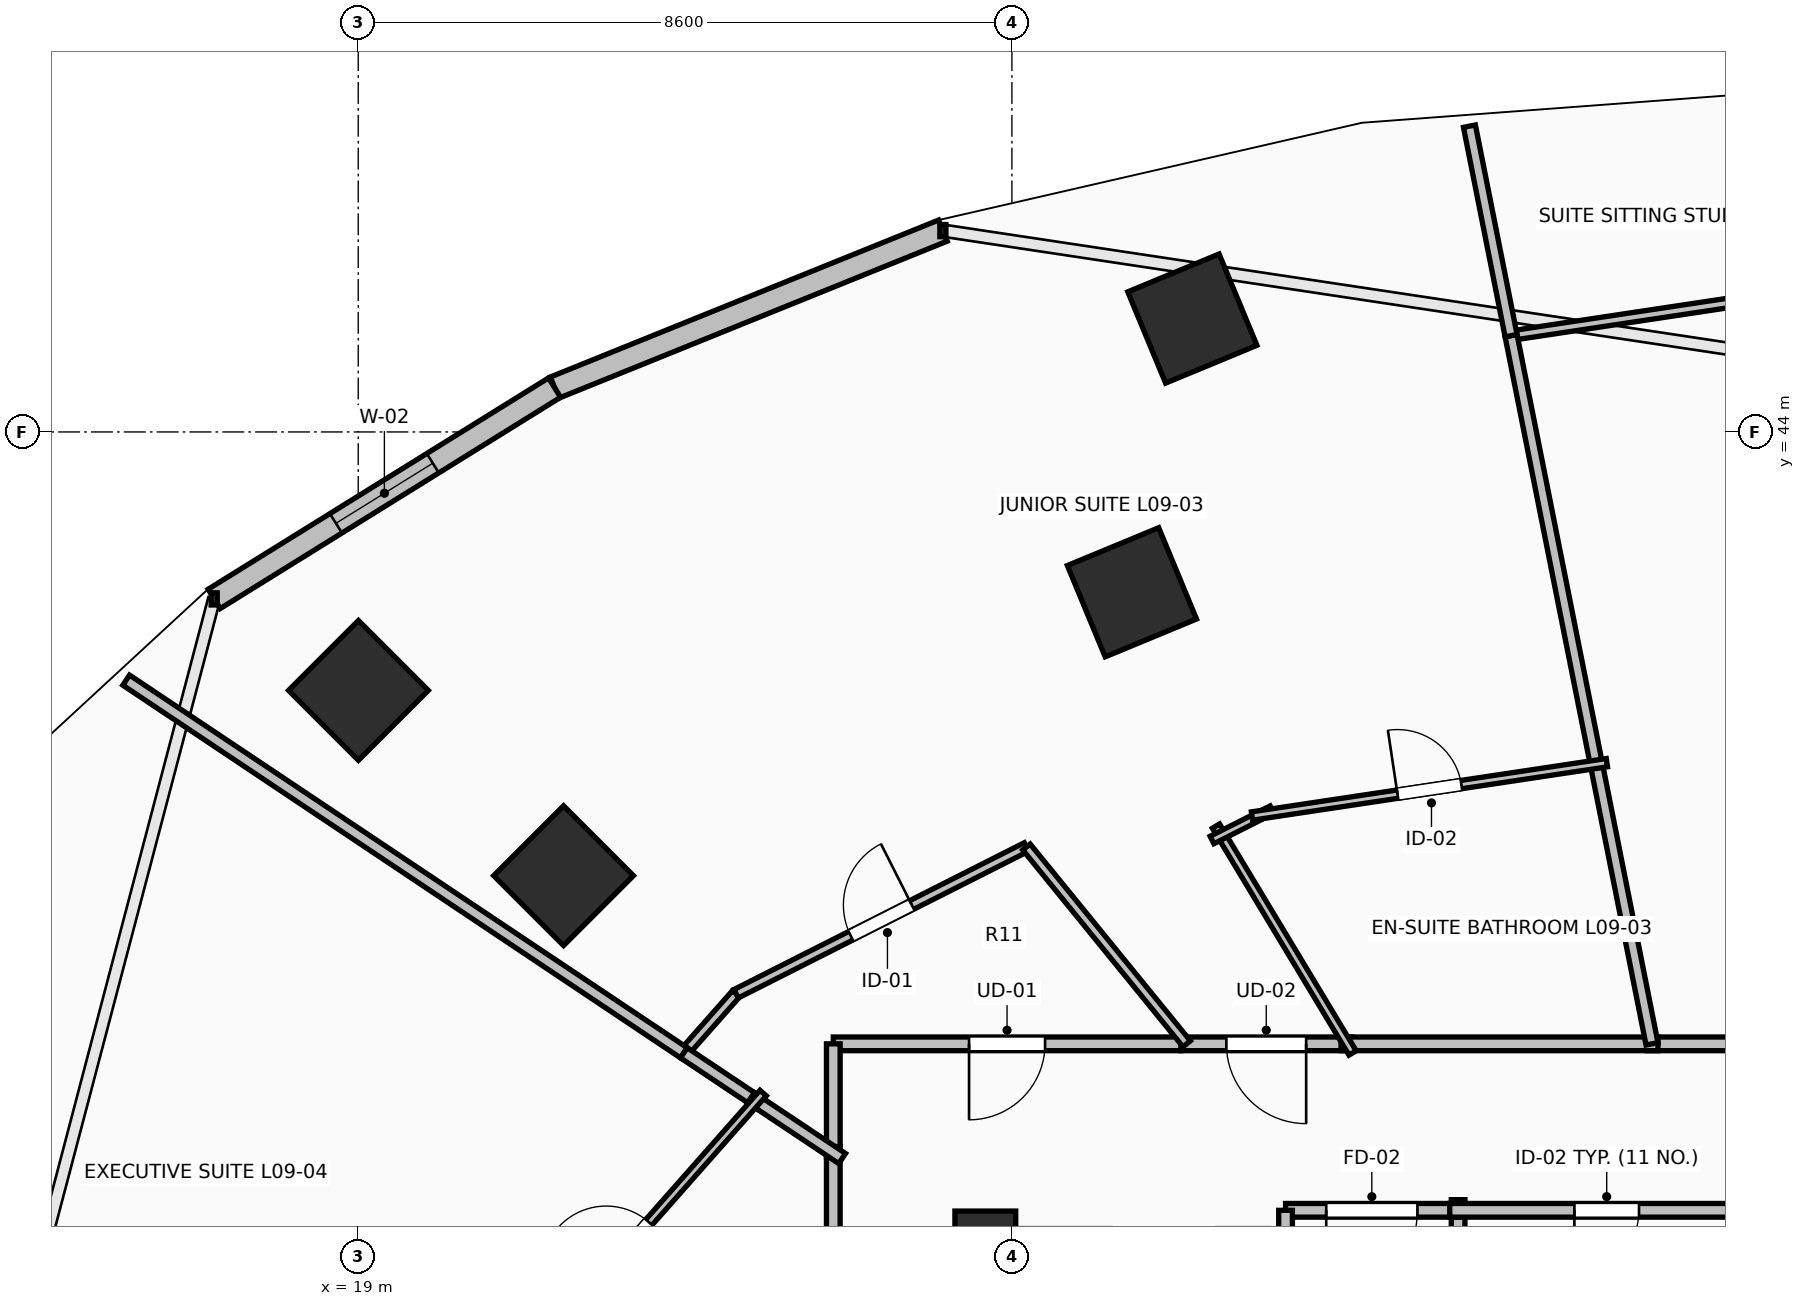
"""IFC4 building model, lengths in metres.
Left out: names, types, materials, properties, quantities, classifications, styles, units other than length and angle.
Written with IfcOpenShell. Run it as: python <this file> out.ifc"""

import sys

from ifc_helpers import new_model, si_unit, direction, frame, frame_2d, origin, origin_2d, place, context, subcontext, project, spatial, rectangle, extrude, element, fill, save


model = new_model("IFC4")
c1 = context("Model", 3, precision=1e-05, world=origin(), true_north=direction((0.0, 1.0)))
c2 = subcontext(c1, "Body", "Model", "MODEL_VIEW")
j1 = project(units=[si_unit("LENGTHUNIT", "METRE"), si_unit("PLANEANGLEUNIT", "RADIAN")], contexts=[c1])
p1 = place(None, origin())
s1 = spatial("IfcSite", under=j1, at=p1, CompositionType="ELEMENT")
p2 = place(p1, origin())
s2 = spatial("IfcBuilding", under=s1, at=p2, CompositionType="ELEMENT")
p3 = place(p2, frame((0.0, 0.0, 38.0)))
s3 = spatial("IfcBuildingStorey", under=s2, at=p3, CompositionType="ELEMENT", Elevation=38.0)
for number, where, z_axis, x_axis in (
    (1, (29.179, 41.891, 0.0), (0.0, 0.0, 1.0), (-0.383, 0.924, 0.0)),
    (2, (21.701, 38.162, 0.0), (0.0, 0.0, 1.0), (-0.707, 0.707, 0.0)),
    (3, (29.974, 45.492, 0.0), (0.0, 0.0, 1.0), (-0.383, 0.924, 0.0)),
    (4, (19.003, 40.6, 0.0), (0.0, 0.0, 1.0), (-0.707, 0.707, 0.0)),
):
    element("IfcColumn", number, at=place(p3, frame(where, z_axis=z_axis, x_axis=x_axis)), inside=s3, PredefinedType="COLUMN", context=c2, shape_type="SweptSolid", body=[
        extrude(rectangle(XDim=1.3, YDim=1.3, at=origin_2d()), origin(), (0.0, 0.0, 1.0), 3.5),
    ])
p4 = place(p3, frame((27.25, 33.15, 0.0), z_axis=(0.0, 0.0, 1.0), x_axis=(1.0, 0.0, 0.0)))
e5 = element("IfcColumn", 5, at=p4, inside=s3, PredefinedType="PILASTER", context=c2, shape_type="SweptSolid", body=[
    extrude(rectangle(XDim=0.8, YDim=1.2, at=origin_2d()), origin(), (0.0, 0.0, 1.0), 3.5),
])
p5 = place(p3, frame((26.692, 46.649, 0.0), z_axis=(0.0, 0.0, 1.0), x_axis=(-0.927095325176, -0.374825636845, 0.0)))
e6 = element("IfcWall", 6, at=p5, inside=s3, PredefinedType="STANDARD", context=c2, shape_type="SweptSolid", body=[
    extrude(rectangle(XDim=5.51, YDim=0.3, at=frame_2d((2.755, 0.0))), origin(), (0.0, 0.0, 1.0), 3.24),
])
p6 = place(p3, frame((21.583, 44.583, 0.0), z_axis=(0.0, 0.0, 1.0), x_axis=(-0.849633724826, -0.527373239404, 0.0)))
e7 = element("IfcWall", 7, at=p6, inside=s3, PredefinedType="STANDARD", context=c2, shape_type="SweptSolid", body=[
    extrude(rectangle(XDim=5.271, YDim=0.3, at=frame_2d((2.635, 0.0))), origin(), (0.0, 0.0, 1.0), 3.24),
])
p7 = place(p6, frame((1.885, 0.0, 0.85)))
e8 = element("IfcOpeningElement", 8, at=p7, cuts=e7, PredefinedType="OPENING", context=c2, shape_type="SweptSolid", body=[
    extrude(rectangle(XDim=1.5, YDim=2.19, at=frame_2d((0.75, 1.095))), frame((0.0, 0.165, 0.0), z_axis=(0.0, -1.0, 0.0), x_axis=(1.0, 0.0, 0.0)), (0.0, 0.0, 1.0), 0.33),
])
p8 = place(p3, frame((33.47, 30.34, 0.0), z_axis=(0.0, 0.0, 1.0), x_axis=(0.0, 1.0, 0.0)))
e9 = element("IfcWall", 9, at=p8, inside=s3, PredefinedType="PARTITIONING", context=c2, shape_type="SweptSolid", body=[
    extrude(rectangle(XDim=3.56, YDim=0.18, at=frame_2d((1.78, 0.0))), origin(), (0.0, 0.0, 1.0), 3.24),
])
p9 = place(p3, frame((33.47, 33.76, 0.0), z_axis=(0.0, 0.0, 1.0), x_axis=(-1.0, 0.0, 0.0)))
e10 = element("IfcWall", 10, at=p9, inside=s3, PredefinedType="PARTITIONING", context=c2, shape_type="SweptSolid", body=[
    extrude(rectangle(XDim=2.27, YDim=0.18, at=frame_2d((1.135, 0.0))), origin(), (0.0, 0.0, 1.0), 3.24),
])
p10 = place(p9, frame((0.535, 0.0, 0.0)))
e11 = element("IfcOpeningElement", 11, at=p10, cuts=e10, PredefinedType="OPENING", context=c2, shape_type="SweptSolid", body=[
    extrude(rectangle(XDim=1.2, YDim=2.15, at=frame_2d((0.6, 1.075))), frame((0.0, 0.105, 0.0), z_axis=(0.0, -1.0, 0.0), x_axis=(1.0, 0.0, 0.0)), (0.0, 0.0, 1.0), 0.21),
])
p11 = place(p3, frame((31.2, 33.76, 0.0), z_axis=(0.0, 0.0, 1.0), x_axis=(0.0, -1.0, 0.0)))
e12 = element("IfcWall", 12, at=p11, inside=s3, PredefinedType="PARTITIONING", context=c2, shape_type="SweptSolid", body=[
    extrude(rectangle(XDim=0.56, YDim=0.18, at=frame_2d((0.28, 0.0))), origin(), (0.0, 0.0, 1.0), 3.24),
])
p12 = place(p3, frame((37.49, 33.76, 0.0), z_axis=(0.0, 0.0, 1.0), x_axis=(-1.0, 0.0, 0.0)))
e13 = element("IfcWall", 13, at=p12, inside=s3, PredefinedType="PARTITIONING", context=c2, shape_type="SweptSolid", body=[
    extrude(rectangle(XDim=4.13, YDim=0.18, at=frame_2d((2.065, 0.0))), origin(), (0.0, 0.0, 1.0), 3.24),
])
p13 = place(p12, frame((1.64, 0.0, 0.0)))
e14 = element("IfcOpeningElement", 14, at=p13, cuts=e13, PredefinedType="OPENING", context=c2, shape_type="SweptSolid", body=[
    extrude(rectangle(XDim=0.85, YDim=2.1, at=frame_2d((0.425, 1.05))), frame((0.0, 0.105, 0.0), z_axis=(0.0, -1.0, 0.0), x_axis=(1.0, 0.0, 0.0)), (0.0, 0.0, 1.0), 0.21),
])
p14 = place(p3, frame((40.534, 35.95, 0.0), z_axis=(0.0, 0.0, 1.0), x_axis=(-1.0, 0.0, 0.0)))
e15 = element("IfcWall", 15, at=p14, inside=s3, PredefinedType="PARTITIONING", context=c2, shape_type="SweptSolid", body=[
    extrude(rectangle(XDim=4.574, YDim=0.18, at=frame_2d((2.287, 0.0))), origin(), (0.0, 0.0, 1.0), 3.24),
])
p15 = place(p14, frame((1.762, 0.0, 0.0)))
e16 = element("IfcOpeningElement", 16, at=p15, cuts=e15, PredefinedType="OPENING", context=c2, shape_type="SweptSolid", body=[
    extrude(rectangle(XDim=1.05, YDim=2.2, at=frame_2d((0.525, 1.1))), frame((0.0, 0.105, 0.0), z_axis=(0.0, -1.0, 0.0), x_axis=(1.0, 0.0, 0.0)), (0.0, 0.0, 1.0), 0.21),
])
p16 = place(p3, frame((32.07, 35.95, 0.0), z_axis=(0.0, 0.0, 1.0), x_axis=(-1.0, 0.0, 0.0)))
e17 = element("IfcWall", 17, at=p16, inside=s3, PredefinedType="PARTITIONING", context=c2, shape_type="SweptSolid", body=[
    extrude(rectangle(XDim=2.248, YDim=0.18, at=frame_2d((1.124, 0.0))), origin(), (0.0, 0.0, 1.0), 2.432),
])
p17 = place(p16, frame((0.599, 0.0, 0.0)))
e18 = element("IfcOpeningElement", 18, at=p17, cuts=e17, PredefinedType="OPENING", context=c2, shape_type="SweptSolid", body=[
    extrude(rectangle(XDim=1.05, YDim=2.2, at=frame_2d((0.525, 1.1))), frame((0.0, 0.105, 0.0), z_axis=(0.0, -1.0, 0.0), x_axis=(1.0, 0.0, 0.0)), (0.0, 0.0, 1.0), 0.21),
])
p18 = place(p3, frame((36.1, 35.95, 0.0), z_axis=(0.0, 0.0, 1.0), x_axis=(-1.0, 0.0, 0.0)))
e19 = element("IfcWall", 19, at=p18, inside=s3, PredefinedType="PARTITIONING", context=c2, shape_type="SweptSolid", body=[
    extrude(rectangle(XDim=4.17, YDim=0.18, at=frame_2d((2.085, 0.0))), origin(), (0.0, 0.0, 1.0), 3.24),
])
p19 = place(p3, frame((29.822, 35.95, 0.0), z_axis=(0.0, 0.0, 1.0), x_axis=(-1.0, 0.0, 0.0)))
e20 = element("IfcWall", 20, at=p19, inside=s3, PredefinedType="PARTITIONING", context=c2, shape_type="SweptSolid", body=[
    extrude(rectangle(XDim=4.572, YDim=0.18, at=frame_2d((2.286, 0.0))), origin(), (0.0, 0.0, 1.0), 2.432),
])
p20 = place(p19, frame((1.786, 0.0, 0.0)))
e21 = element("IfcOpeningElement", 21, at=p20, cuts=e20, PredefinedType="OPENING", context=c2, shape_type="SweptSolid", body=[
    extrude(rectangle(XDim=1.0, YDim=2.15, at=frame_2d((0.5, 1.075))), frame((0.0, 0.105, 0.0), z_axis=(0.0, -1.0, 0.0), x_axis=(1.0, 0.0, 0.0)), (0.0, 0.0, 1.0), 0.21),
])
p21 = place(p3, frame((25.25, 35.95, 0.0), z_axis=(0.0, 0.0, 1.0), x_axis=(0.0, -1.0, 0.0)))
e22 = element("IfcWall", 22, at=p21, inside=s3, PredefinedType="PARTITIONING", context=c2, shape_type="SweptSolid", body=[
    extrude(rectangle(XDim=1.491, YDim=0.18, at=frame_2d((0.746, 0.0))), origin(), (0.0, 0.0, 1.0), 2.432),
])
p22 = place(p3, frame((25.25, 34.599, 0.0), z_axis=(0.0, 0.0, 1.0), x_axis=(0.0, -1.0, 0.0)))
e23 = element("IfcWall", 23, at=p22, inside=s3, PredefinedType="PARTITIONING", context=c2, shape_type="SweptSolid", body=[
    extrude(rectangle(XDim=5.51, YDim=0.18, at=frame_2d((2.755, 0.0))), origin(), (0.0, 0.0, 1.0), 2.432),
])
p23 = place(p3, frame((38.0, 45.844, 0.0), z_axis=(0.0, 0.0, 1.0), x_axis=(-0.988862311426, -0.148833225599, 0.0)))
e24 = element("IfcWall", 24, at=p23, inside=s3, PredefinedType="PARTITIONING", context=c2, shape_type="SweptSolid", body=[
    extrude(rectangle(XDim=3.876, YDim=0.125, at=frame_2d((1.938, 0.0))), origin(), (0.0, 0.0, 1.0), 2.624),
])
p24 = place(p3, frame((34.167, 45.267, 0.0), z_axis=(0.0, 0.0, 1.0), x_axis=(0.19516219459, -0.980770981322, 0.0)))
e25 = element("IfcWall", 25, at=p24, inside=s3, PredefinedType="PARTITIONING", context=c2, shape_type="SweptSolid", body=[
    extrude(rectangle(XDim=9.5, YDim=0.16, at=frame_2d((4.75, 0.0))), origin(), (0.0, 0.0, 1.0), 2.432),
])
p25 = place(p3, frame((33.619, 48.023, 0.0), z_axis=(0.0, 0.0, 1.0), x_axis=(0.195063341769, -0.980790646722, 0.0)))
e26 = element("IfcWall", 26, at=p25, inside=s3, PredefinedType="PARTITIONING", context=c2, shape_type="SweptSolid", body=[
    extrude(rectangle(XDim=2.81, YDim=0.16, at=frame_2d((1.405, 0.0))), origin(), (0.0, 0.0, 1.0), 2.624),
])
p26 = place(p3, frame((32.082, 35.83, 0.0), z_axis=(0.0, 0.0, 1.0), x_axis=(-0.51585529038, 0.856675737597, 0.0)))
e27 = element("IfcWall", 27, at=p26, inside=s3, PredefinedType="PARTITIONING", context=c2, shape_type="SweptSolid", body=[
    extrude(rectangle(XDim=3.484, YDim=0.11, at=frame_2d((1.742, 0.0))), origin(), (0.0, 0.0, 1.0), 2.432),
])
p27 = place(p3, frame((30.232, 38.632, 0.0), z_axis=(0.0, 0.0, 1.0), x_axis=(0.892376579336, 0.451291525129, 0.0)))
e28 = element("IfcWall", 28, at=p27, inside=s3, PredefinedType="PARTITIONING", context=c2, shape_type="SweptSolid", body=[
    extrude(rectangle(XDim=0.885, YDim=0.11, at=frame_2d((0.442, 0.0))), origin(), (0.0, 0.0, 1.0), 3.24),
])
p28 = place(p3, frame((30.759, 38.947, 0.0), z_axis=(0.0, 0.0, 1.0), x_axis=(0.9889029502, 0.148562966739, 0.0)))
e29 = element("IfcWall", 29, at=p28, inside=s3, PredefinedType="PARTITIONING", context=c2, shape_type="SweptSolid", body=[
    extrude(rectangle(XDim=4.721, YDim=0.11, at=frame_2d((2.361, 0.0))), origin(), (0.0, 0.0, 1.0), 2.432),
])
p29 = place(p28, frame((1.936, 0.0, 0.0)))
e30 = element("IfcOpeningElement", 30, at=p29, cuts=e29, PredefinedType="OPENING", context=c2, shape_type="SweptSolid", body=[
    extrude(rectangle(XDim=0.85, YDim=2.1, at=frame_2d((0.425, 1.05))), frame((0.0, 0.07, 0.0), z_axis=(0.0, -1.0, 0.0), x_axis=(1.0, 0.0, 0.0)), (0.0, 0.0, 1.0), 0.14),
])
p30 = place(p3, frame((23.284, 35.832, 0.0), z_axis=(0.0, 0.0, 1.0), x_axis=(0.662462125237, 0.749095409561, 0.0)))
e31 = element("IfcWall", 31, at=p30, inside=s3, PredefinedType="PARTITIONING", context=c2, shape_type="SweptSolid", body=[
    extrude(rectangle(XDim=1.037, YDim=0.125, at=frame_2d((0.519, 0.0))), origin(), (0.0, 0.0, 1.0), 2.432),
])
p31 = place(p3, frame((23.971, 36.609, 0.0), z_axis=(0.0, 0.0, 1.0), x_axis=(0.892445030909, 0.451156144596, 0.0)))
e32 = element("IfcWall", 32, at=p31, inside=s3, PredefinedType="PARTITIONING", context=c2, shape_type="SweptSolid", body=[
    extrude(rectangle(XDim=4.281, YDim=0.125, at=frame_2d((2.14, 0.0))), origin(), (0.0, 0.0, 1.0), 3.24),
])
p32 = place(p31, frame((1.69, 0.0, 0.0)))
e33 = element("IfcOpeningElement", 33, at=p32, cuts=e32, PredefinedType="OPENING", context=c2, shape_type="SweptSolid", body=[
    extrude(rectangle(XDim=0.9, YDim=2.1, at=frame_2d((0.45, 1.05))), frame((0.0, 0.077, 0.0), z_axis=(0.0, -1.0, 0.0), x_axis=(1.0, 0.0, 0.0)), (0.0, 0.0, 1.0), 0.155),
])
p33 = place(p3, frame((27.791, 38.54, 0.0), z_axis=(0.0, 0.0, 1.0), x_axis=(0.631217195835, -0.775606118904, 0.0)))
e34 = element("IfcWall", 34, at=p33, inside=s3, PredefinedType="PARTITIONING", context=c2, shape_type="SweptSolid", body=[
    extrude(rectangle(XDim=3.339, YDim=0.125, at=frame_2d((1.67, 0.0))), origin(), (0.0, 0.0, 1.0), 2.432),
])
p34 = place(p3, frame((15.947, 40.735, 0.0), z_axis=(0.0, 0.0, 1.0), x_axis=(0.831432604336, -0.555625615363, 0.0)))
e35 = element("IfcWall", 35, at=p34, inside=s3, PredefinedType="PARTITIONING", context=c2, shape_type="SweptSolid", body=[
    extrude(rectangle(XDim=8.824, YDim=0.16, at=frame_2d((4.412, 0.0))), origin(), (0.0, 0.0, 1.0), 2.624),
])
p35 = place(p3, frame((23.284, 35.832, 0.0), z_axis=(0.0, 0.0, 1.0), x_axis=(0.831550226979, -0.555449565677, 0.0)))
e36 = element("IfcWall", 36, at=p35, inside=s3, PredefinedType="PARTITIONING", context=c2, shape_type="SweptSolid", body=[
    extrude(rectangle(XDim=1.203, YDim=0.16, at=frame_2d((0.601, 0.0))), origin(), (0.0, 0.0, 1.0), 2.972),
])
p36 = place(p3, frame((24.167, 35.241, 0.0), z_axis=(0.0, 0.0, 1.0), x_axis=(0.831815696492, -0.555051931868, 0.0)))
e37 = element("IfcWall", 37, at=p36, inside=s3, PredefinedType="PARTITIONING", context=c2, shape_type="SweptSolid", body=[
    extrude(rectangle(XDim=1.441, YDim=0.16, at=frame_2d((0.721, 0.0))), origin(), (0.0, 0.0, 1.0), 2.972),
])
p37 = place(p3, frame((20.76, 31.266, 0.0), z_axis=(0.0, 0.0, 1.0), x_axis=(0.662087707802, 0.749426358742, 0.0)))
e38 = element("IfcWall", 38, at=p37, inside=s3, PredefinedType="PARTITIONING", context=c2, shape_type="SweptSolid", body=[
    extrude(rectangle(XDim=5.387, YDim=0.11, at=frame_2d((2.693, 0.0))), origin(), (0.0, 0.0, 1.0), 2.972),
])
p38 = place(p37, frame((2.268, 0.0, 0.0)))
e39 = element("IfcOpeningElement", 39, at=p38, cuts=e38, PredefinedType="OPENING", context=c2, shape_type="SweptSolid", body=[
    extrude(rectangle(XDim=0.85, YDim=2.1, at=frame_2d((0.425, 1.05))), frame((0.0, 0.07, 0.0), z_axis=(0.0, -1.0, 0.0), x_axis=(1.0, 0.0, 0.0)), (0.0, 0.0, 1.0), 0.14),
])
p39 = place(p7, origin())
e40 = element("IfcWindow", 40, at=p39, inside=s3, PartitioningType="SINGLE_PANEL", PredefinedType="WINDOW", context=c2, shape_type="SweptSolid", body=[
    extrude(rectangle(XDim=1.5, YDim=2.19, at=frame_2d((0.75, 1.095))), frame((0.0, 0.03, 0.0), z_axis=(0.0, -1.0, 0.0), x_axis=(1.0, 0.0, 0.0)), (0.0, 0.0, 1.0), 0.06),
])
fill(e8, e40)
p40 = place(p10, origin())
e41 = element("IfcDoor", 41, at=p40, inside=s3, OperationType="SINGLE_SWING_RIGHT", PredefinedType="DOOR", context=c2, shape_type="SweptSolid", body=[
    extrude(rectangle(XDim=1.2, YDim=2.15, at=frame_2d((0.6, 1.075))), frame((0.0, 0.025, 0.0), z_axis=(0.0, -1.0, 0.0), x_axis=(1.0, 0.0, 0.0)), (0.0, 0.0, 1.0), 0.05),
])
fill(e11, e41)
p41 = place(p13, origin())
e42 = element("IfcDoor", 42, at=p41, inside=s3, OperationType="SINGLE_SWING_RIGHT", PredefinedType="DOOR", context=c2, shape_type="SweptSolid", body=[
    extrude(rectangle(XDim=0.85, YDim=2.1, at=frame_2d((0.425, 1.05))), frame((0.0, 0.025, 0.0), z_axis=(0.0, -1.0, 0.0), x_axis=(1.0, 0.0, 0.0)), (0.0, 0.0, 1.0), 0.05),
])
fill(e14, e42)
p42 = place(p17, origin())
e43 = element("IfcDoor", 43, at=p42, inside=s3, OperationType="SINGLE_SWING_LEFT", PredefinedType="DOOR", context=c2, shape_type="SweptSolid", body=[
    extrude(rectangle(XDim=1.05, YDim=2.2, at=frame_2d((0.525, 1.1))), frame((0.0, 0.025, 0.0), z_axis=(0.0, -1.0, 0.0), x_axis=(1.0, 0.0, 0.0)), (0.0, 0.0, 1.0), 0.05),
])
fill(e18, e43)
p43 = place(p20, origin())
e44 = element("IfcDoor", 44, at=p43, inside=s3, OperationType="SINGLE_SWING_RIGHT", PredefinedType="DOOR", context=c2, shape_type="SweptSolid", body=[
    extrude(rectangle(XDim=1.0, YDim=2.15, at=frame_2d((0.5, 1.075))), frame((0.0, 0.025, 0.0), z_axis=(0.0, -1.0, 0.0), x_axis=(1.0, 0.0, 0.0)), (0.0, 0.0, 1.0), 0.05),
])
fill(e21, e44)
p44 = place(p29, origin())
e45 = element("IfcDoor", 45, at=p44, inside=s3, OperationType="SINGLE_SWING_LEFT", PredefinedType="DOOR", context=c2, shape_type="SweptSolid", body=[
    extrude(rectangle(XDim=0.85, YDim=2.1, at=frame_2d((0.425, 1.05))), frame((0.0, 0.025, 0.0), z_axis=(0.0, -1.0, 0.0), x_axis=(1.0, 0.0, 0.0)), (0.0, 0.0, 1.0), 0.05),
])
fill(e30, e45)
p45 = place(p32, origin())
e46 = element("IfcDoor", 46, at=p45, inside=s3, OperationType="SINGLE_SWING_RIGHT", PredefinedType="DOOR", context=c2, shape_type="SweptSolid", body=[
    extrude(rectangle(XDim=0.9, YDim=2.1, at=frame_2d((0.45, 1.05))), frame((0.0, 0.025, 0.0), z_axis=(0.0, -1.0, 0.0), x_axis=(1.0, 0.0, 0.0)), (0.0, 0.0, 1.0), 0.05),
])
fill(e33, e46)
p46 = place(p38, origin())
e47 = element("IfcDoor", 47, at=p46, inside=s3, OperationType="SINGLE_SWING_LEFT", PredefinedType="DOOR", context=c2, shape_type="SweptSolid", body=[
    extrude(rectangle(XDim=0.85, YDim=2.1, at=frame_2d((0.425, 1.05))), frame((0.0, 0.025, 0.0), z_axis=(0.0, -1.0, 0.0), x_axis=(1.0, 0.0, 0.0)), (0.0, 0.0, 1.0), 0.05),
])
fill(e39, e47)
save(model, sys.argv[1])
